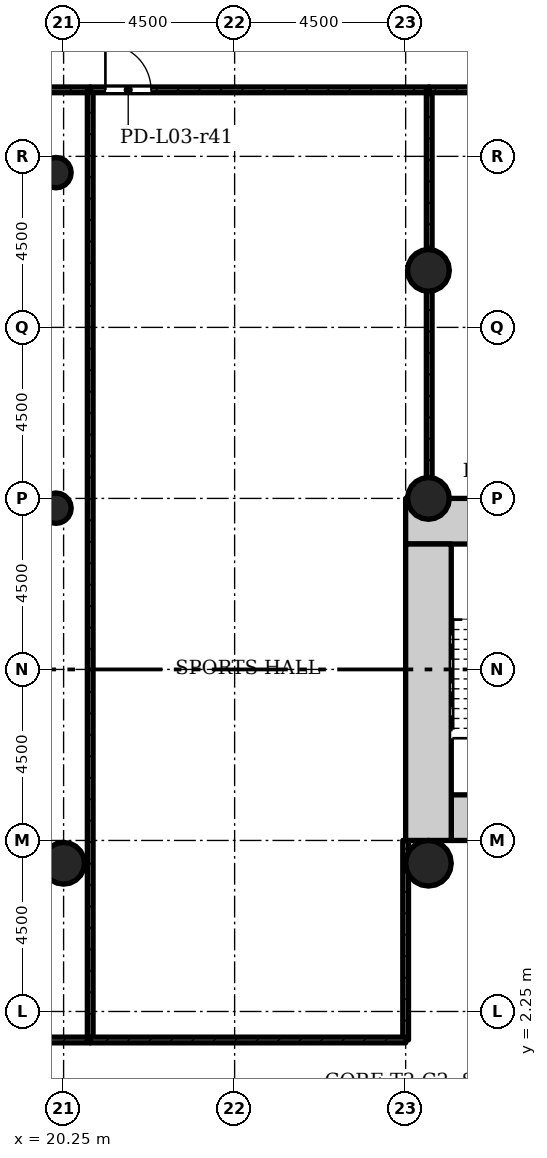
"""IFC4 building model, lengths in metres.
Left out: names, types, materials, properties, quantities, classifications, styles, units other than length and angle.
Written with IfcOpenShell. Run it as: python <this file> out.ifc"""

import sys

from ifc_helpers import new_model, si_unit, direction, frame, frame_2d, origin, origin_2d, place, context, subcontext, project, spatial, rectangle, hollow_circle, extrude, element, fill, save


model = new_model("IFC4")
c1 = context("Model", 3, precision=1e-05, world=origin(), true_north=direction((0.0, 1.0)))
c2 = subcontext(c1, "Body", "Model", "MODEL_VIEW")
j1 = project(units=[si_unit("LENGTHUNIT", "METRE"), si_unit("PLANEANGLEUNIT", "RADIAN")], contexts=[c1])
p1 = place(None, origin())
s1 = spatial("IfcSite", under=j1, at=p1, CompositionType="ELEMENT")
p2 = place(p1, origin())
s2 = spatial("IfcBuilding", under=s1, at=p2, CompositionType="ELEMENT")
p3 = place(p2, frame((0.0, 0.0, 15.5)))
s3 = spatial("IfcBuildingStorey", under=s2, at=p3, CompositionType="ELEMENT", Elevation=15.5)
p4 = place(p3, frame((30.45, 7.35, 0.0), z_axis=(0.0, 0.0, 1.0), x_axis=(1.0, 0.0, 0.0)))
e1 = element("IfcWall", 1, at=p4, inside=s3, PredefinedType="SHEAR", context=c2, shape_type="SweptSolid", body=[
    extrude(rectangle(XDim=12.3, YDim=1.2, at=frame_2d((6.15, 0.0))), origin(), (0.0, 0.0, 1.0), 4.5),
])
p5 = place(p4, frame((4.65, 0.0, 0.0)))
e2 = element("IfcOpeningElement", 2, at=p5, cuts=e1, PredefinedType="OPENING", context=c2, shape_type="SweptSolid", body=[
    extrude(rectangle(XDim=1.8, YDim=2.1, at=frame_2d((0.9, 1.05))), frame((0.0, 0.61, 0.0), z_axis=(0.0, -1.0, 0.0), x_axis=(1.0, 0.0, 0.0)), (0.0, 0.0, 1.0), 1.22),
])
p6 = place(p3, frame((41.55, 15.15, 0.0), z_axis=(0.0, 0.0, 1.0), x_axis=(-1.0, 0.0, 0.0)))
e3 = element("IfcWall", 3, at=p6, inside=s3, PredefinedType="SHEAR", context=c2, shape_type="SweptSolid", body=[
    extrude(rectangle(XDim=12.3, YDim=1.2, at=frame_2d((6.15, 0.0))), origin(), (0.0, 0.0, 1.0), 4.5),
])
p7 = place(p6, frame((4.65, 0.0, 0.0)))
e4 = element("IfcOpeningElement", 4, at=p7, cuts=e3, PredefinedType="OPENING", context=c2, shape_type="SweptSolid", body=[
    extrude(rectangle(XDim=1.8, YDim=2.1, at=frame_2d((0.9, 1.05))), frame((0.0, 0.61, 0.0), z_axis=(0.0, -1.0, 0.0), x_axis=(1.0, 0.0, 0.0)), (0.0, 0.0, 1.0), 1.22),
])
p8 = place(p3, frame((29.85, 14.55, 0.0), z_axis=(0.0, 0.0, 1.0), x_axis=(0.0, -1.0, 0.0)))
e5 = element("IfcWall", 5, at=p8, inside=s3, PredefinedType="SHEAR", context=c2, shape_type="SweptSolid", body=[
    extrude(rectangle(XDim=7.8, YDim=1.2, at=frame_2d((3.9, 0.0))), origin(), (0.0, 0.0, 1.0), 4.5),
])
for number, where, z_axis, x_axis in (
    (6, (29.85, 15.75, 0.0), (0.0, 0.0, 1.0), (1.0, 0.0, 0.0)),
    (7, (29.85, 21.75, 0.0), (0.0, 0.0, 1.0), (1.0, 0.0, 0.0)),
    (8, (20.25, 6.15, 0.0), (0.0, 0.0, 1.0), (1.0, 0.0, 0.0)),
):
    element("IfcColumn", number, at=place(p3, frame(where, z_axis=z_axis, x_axis=x_axis)), inside=s3, PredefinedType="COLUMN", context=c2, shape_type="SweptSolid", body=[
        extrude(hollow_circle(Radius=0.55, WallThickness=0.04, at=origin_2d()), origin(), (0.0, 0.0, 1.0), 4.5),
    ])
p9 = place(p3, frame((29.85, 6.15, 0.0), z_axis=(0.0, 0.0, 1.0), x_axis=(1.0, 0.0, 0.0)))
e9 = element("IfcColumn", 9, at=p9, inside=s3, PredefinedType="COLUMN", context=c2, shape_type="SweptSolid", body=[
    extrude(hollow_circle(Radius=0.6, WallThickness=0.045, at=origin_2d()), origin(), (0.0, 0.0, 1.0), 4.5),
])
for number, where, z_axis, x_axis in (
    (10, (20.05, 15.493, 0.0), (0.0, 0.0, 1.0), (1.0, 0.0, 0.0)),
    (11, (20.05, 24.321, 0.0), (0.0, 0.0, 1.0), (1.0, 0.0, 0.0)),
):
    element("IfcColumn", number, at=place(p3, frame(where, z_axis=z_axis, x_axis=x_axis)), inside=s3, PredefinedType="COLUMN", context=c2, shape_type="SweptSolid", body=[
        extrude(hollow_circle(Radius=0.4, WallThickness=0.028, at=origin_2d()), origin(), (0.0, 0.0, 1.0), 4.5),
    ])
p10 = place(p3, frame((12.03, 26.5, 0.0), z_axis=(0.0, 0.0, 1.0), x_axis=(1.0, 0.0, 0.0)))
e12 = element("IfcWall", 12, at=p10, inside=s3, PredefinedType="PARTITIONING", context=c2, shape_type="SweptSolid", body=[
    extrude(rectangle(XDim=8.92, YDim=0.15, at=frame_2d((4.46, 0.0))), origin(), (0.0, 0.0, 1.0), 4.08),
])
p11 = place(p10, frame((0.4, 0.0, 0.0)))
e13 = element("IfcOpeningElement", 13, at=p11, cuts=e12, PredefinedType="OPENING", context=c2, shape_type="SweptSolid", body=[
    extrude(rectangle(XDim=1.2, YDim=2.1, at=frame_2d((0.6, 1.05))), frame((0.0, 0.085, 0.0), z_axis=(0.0, -1.0, 0.0), x_axis=(1.0, 0.0, 0.0)), (0.0, 0.0, 1.0), 0.17),
])
p12 = place(p3, frame((20.95, 1.5, 0.0), z_axis=(0.0, 0.0, 1.0), x_axis=(-1.0, 0.0, 0.0)))
e14 = element("IfcWall", 14, at=p12, inside=s3, PredefinedType="PARTITIONING", context=c2, shape_type="SweptSolid", body=[
    extrude(rectangle(XDim=4.92, YDim=0.15, at=frame_2d((2.46, 0.0))), origin(), (0.0, 0.0, 1.0), 4.08),
])
p13 = place(p3, frame((20.95, 26.5, 0.0), z_axis=(0.0, 0.0, 1.0), x_axis=(0.0, -1.0, 0.0)))
e15 = element("IfcWall", 15, at=p13, inside=s3, PredefinedType="PARTITIONING", context=c2, shape_type="SweptSolid", body=[
    extrude(rectangle(XDim=25.0, YDim=0.15, at=frame_2d((12.5, 0.0))), origin(), (0.0, 0.0, 1.0), 4.08),
])
p14 = place(p3, frame((20.95, 26.5, 0.0), z_axis=(0.0, 0.0, 1.0), x_axis=(1.0, 0.0, 0.0)))
e16 = element("IfcWall", 16, at=p14, inside=s3, PredefinedType="PARTITIONING", context=c2, shape_type="SweptSolid", body=[
    extrude(rectangle(XDim=8.92, YDim=0.15, at=frame_2d((4.46, 0.0))), origin(), (0.0, 0.0, 1.0), 4.08),
])
p15 = place(p14, frame((0.4, 0.0, 0.0)))
e17 = element("IfcOpeningElement", 17, at=p15, cuts=e16, PredefinedType="OPENING", context=c2, shape_type="SweptSolid", body=[
    extrude(rectangle(XDim=1.2, YDim=2.1, at=frame_2d((0.6, 1.05))), frame((0.0, 0.085, 0.0), z_axis=(0.0, -1.0, 0.0), x_axis=(1.0, 0.0, 0.0)), (0.0, 0.0, 1.0), 0.17),
])
p16 = place(p3, frame((29.25, 6.75, 0.0), z_axis=(0.0, 0.0, 1.0), x_axis=(0.0, -1.0, 0.0)))
e18 = element("IfcWall", 18, at=p16, inside=s3, PredefinedType="PARTITIONING", context=c2, shape_type="SweptSolid", body=[
    extrude(rectangle(XDim=5.25, YDim=0.15, at=frame_2d((2.625, 0.0))), origin(), (0.0, 0.0, 1.0), 4.08),
])
p17 = place(p3, frame((29.25, 1.5, 0.0), z_axis=(0.0, 0.0, 1.0), x_axis=(-1.0, 0.0, 0.0)))
e19 = element("IfcWall", 19, at=p17, inside=s3, PredefinedType="PARTITIONING", context=c2, shape_type="SweptSolid", body=[
    extrude(rectangle(XDim=8.3, YDim=0.15, at=frame_2d((4.15, 0.0))), origin(), (0.0, 0.0, 1.0), 4.08),
])
p18 = place(p3, frame((29.87, 26.5, 0.0), z_axis=(0.0, 0.0, 1.0), x_axis=(0.0, -1.0, 0.0)))
e20 = element("IfcWall", 20, at=p18, inside=s3, PredefinedType="PARTITIONING", context=c2, shape_type="SweptSolid", body=[
    extrude(rectangle(XDim=10.75, YDim=0.15, at=frame_2d((5.375, 0.0))), origin(), (0.0, 0.0, 1.0), 4.08),
])
p19 = place(p3, frame((29.87, 26.5, 0.0), z_axis=(0.0, 0.0, 1.0), x_axis=(1.0, 0.0, 0.0)))
e21 = element("IfcWall", 21, at=p19, inside=s3, PredefinedType="PARTITIONING", context=c2, shape_type="SweptSolid", body=[
    extrude(rectangle(XDim=4.63, YDim=0.15, at=frame_2d((2.315, 0.0))), origin(), (0.0, 0.0, 1.0), 4.08),
])
p20 = place(p15, origin())
e22 = element("IfcDoor", 22, at=p20, inside=s3, OperationType="SINGLE_SWING_RIGHT", PredefinedType="DOOR", context=c2, shape_type="SweptSolid", body=[
    extrude(rectangle(XDim=1.2, YDim=2.1, at=frame_2d((0.6, 1.05))), frame((0.0, 0.025, 0.0), z_axis=(0.0, -1.0, 0.0), x_axis=(1.0, 0.0, 0.0)), (0.0, 0.0, 1.0), 0.05),
])
fill(e17, e22)
save(model, sys.argv[1])
